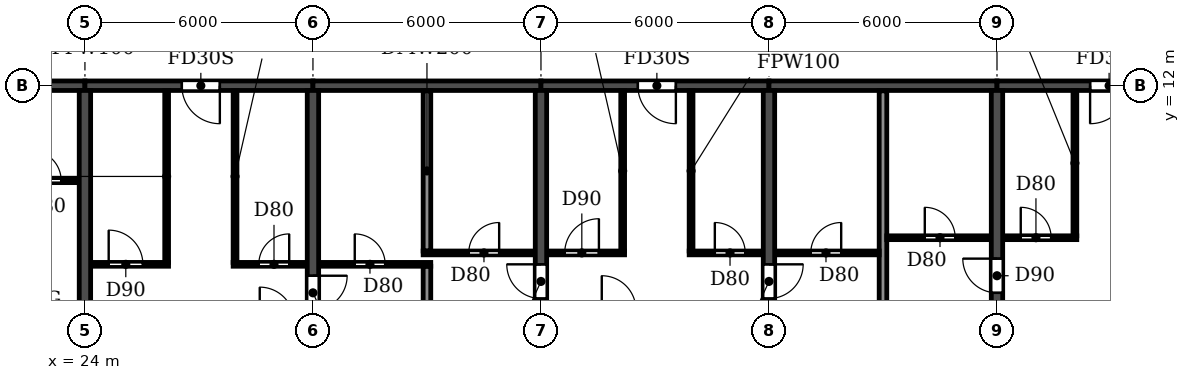
"""IFC4 building model, lengths in metres.
Left out: names, types, materials, properties, quantities, classifications, styles, units other than length and angle.
Written with IfcOpenShell. Run it as: python <this file> out.ifc"""

import sys

from ifc_helpers import new_model, si_unit, direction, frame, frame_2d, origin, place, context, subcontext, project, spatial, rectangle, extrude, element, fill, save


model = new_model("IFC4")
c1 = context("Model", 3, precision=1e-05, world=origin(), true_north=direction((0.0, 1.0)))
c2 = subcontext(c1, "Body", "Model", "MODEL_VIEW")
j1 = project(units=[si_unit("LENGTHUNIT", "METRE"), si_unit("PLANEANGLEUNIT", "RADIAN")], contexts=[c1])
p1 = place(None, origin())
s1 = spatial("IfcSite", under=j1, at=p1, CompositionType="ELEMENT")
p2 = place(p1, origin())
s2 = spatial("IfcBuilding", under=s1, at=p2, CompositionType="ELEMENT")
p3 = place(p2, frame((0.0, 0.0, 152.1)))
s3 = spatial("IfcBuildingStorey", under=s2, at=p3, CompositionType="ELEMENT", Elevation=152.1)
p4 = place(p3, frame((24.0, 0.2, 0.0), z_axis=(0.0, 0.0, 1.0), x_axis=(0.0, 1.0, 0.0)))
e1 = element("IfcWall", 1, at=p4, inside=s3, PredefinedType="SHEAR", context=c2, shape_type="SweptSolid", body=[
    extrude(rectangle(XDim=11.675, YDim=0.3, at=frame_2d((5.837, 0.0))), origin(), (0.0, 0.0, 1.0), 3.07),
])
p5 = place(p3, frame((30.0, 0.2, 0.0), z_axis=(0.0, 0.0, 1.0), x_axis=(0.0, 1.0, 0.0)))
e2 = element("IfcWall", 2, at=p5, inside=s3, PredefinedType="SHEAR", context=c2, shape_type="SweptSolid", body=[
    extrude(rectangle(XDim=11.675, YDim=0.3, at=frame_2d((5.837, 0.0))), origin(), (0.0, 0.0, 1.0), 3.07),
])
p6 = place(p5, frame((5.9, 0.0, 0.0)))
e3 = element("IfcOpeningElement", 3, at=p6, cuts=e2, PredefinedType="OPENING", context=c2, shape_type="SweptSolid", body=[
    extrude(rectangle(XDim=0.9, YDim=2.1, at=frame_2d((0.45, 1.05))), frame((0.0, 0.16, 0.0), z_axis=(0.0, -1.0, 0.0), x_axis=(1.0, 0.0, 0.0)), (0.0, 0.0, 1.0), 0.32),
])
p7 = place(p3, frame((36.0, 0.2, 0.0), z_axis=(0.0, 0.0, 1.0), x_axis=(0.0, 1.0, 0.0)))
e4 = element("IfcWall", 4, at=p7, inside=s3, PredefinedType="SHEAR", context=c2, shape_type="SweptSolid", body=[
    extrude(rectangle(XDim=11.675, YDim=0.3, at=frame_2d((5.837, 0.0))), origin(), (0.0, 0.0, 1.0), 3.07),
])
p8 = place(p7, frame((6.2, 0.0, 0.0)))
e5 = element("IfcOpeningElement", 5, at=p8, cuts=e4, PredefinedType="OPENING", context=c2, shape_type="SweptSolid", body=[
    extrude(rectangle(XDim=0.9, YDim=2.1, at=frame_2d((0.45, 1.05))), frame((0.0, 0.16, 0.0), z_axis=(0.0, -1.0, 0.0), x_axis=(1.0, 0.0, 0.0)), (0.0, 0.0, 1.0), 0.32),
])
p9 = place(p3, frame((42.0, 0.2, 0.0), z_axis=(0.0, 0.0, 1.0), x_axis=(0.0, 1.0, 0.0)))
e6 = element("IfcWall", 6, at=p9, inside=s3, PredefinedType="SHEAR", context=c2, shape_type="SweptSolid", body=[
    extrude(rectangle(XDim=11.675, YDim=0.3, at=frame_2d((5.837, 0.0))), origin(), (0.0, 0.0, 1.0), 3.07),
])
p10 = place(p9, frame((6.2, 0.0, 0.0)))
e7 = element("IfcOpeningElement", 7, at=p10, cuts=e6, PredefinedType="OPENING", context=c2, shape_type="SweptSolid", body=[
    extrude(rectangle(XDim=0.9, YDim=2.1, at=frame_2d((0.45, 1.05))), frame((0.0, 0.16, 0.0), z_axis=(0.0, -1.0, 0.0), x_axis=(1.0, 0.0, 0.0)), (0.0, 0.0, 1.0), 0.32),
])
p11 = place(p3, frame((48.0, 0.2, 0.0), z_axis=(0.0, 0.0, 1.0), x_axis=(0.0, 1.0, 0.0)))
e8 = element("IfcWall", 8, at=p11, inside=s3, PredefinedType="SHEAR", context=c2, shape_type="SweptSolid", body=[
    extrude(rectangle(XDim=11.675, YDim=0.3, at=frame_2d((5.837, 0.0))), origin(), (0.0, 0.0, 1.0), 3.07),
])
p12 = place(p11, frame((6.35, 0.0, 0.0)))
e9 = element("IfcOpeningElement", 9, at=p12, cuts=e8, PredefinedType="OPENING", context=c2, shape_type="SweptSolid", body=[
    extrude(rectangle(XDim=0.9, YDim=2.1, at=frame_2d((0.45, 1.05))), frame((0.0, 0.16, 0.0), z_axis=(0.0, -1.0, 0.0), x_axis=(1.0, 0.0, 0.0)), (0.0, 0.0, 1.0), 0.32),
])
p13 = place(p3, frame((18.0, 12.0, 0.0), z_axis=(0.0, 0.0, 1.0), x_axis=(1.0, 0.0, 0.0)))
e10 = element("IfcWall", 10, at=p13, inside=s3, PredefinedType="SHEAR", context=c2, shape_type="SweptSolid", body=[
    extrude(rectangle(XDim=6.0, YDim=0.25, at=frame_2d((3.0, 0.0))), origin(), (0.0, 0.0, 1.0), 2.47),
])
p14 = place(p13, frame((2.55, 0.0, 0.0)))
e11 = element("IfcOpeningElement", 11, at=p14, cuts=e10, PredefinedType="OPENING", context=c2, shape_type="SweptSolid", body=[
    extrude(rectangle(XDim=1.0, YDim=2.1, at=frame_2d((0.5, 1.05))), frame((0.0, 0.135, 0.0), z_axis=(0.0, -1.0, 0.0), x_axis=(1.0, 0.0, 0.0)), (0.0, 0.0, 1.0), 0.27),
])
p15 = place(p3, frame((24.0, 12.0, 0.0), z_axis=(0.0, 0.0, 1.0), x_axis=(1.0, 0.0, 0.0)))
e12 = element("IfcWall", 12, at=p15, inside=s3, PredefinedType="SHEAR", context=c2, shape_type="SweptSolid", body=[
    extrude(rectangle(XDim=6.0, YDim=0.25, at=frame_2d((3.0, 0.0))), origin(), (0.0, 0.0, 1.0), 2.47),
])
p16 = place(p15, frame((2.55, 0.0, 0.0)))
e13 = element("IfcOpeningElement", 13, at=p16, cuts=e12, PredefinedType="OPENING", context=c2, shape_type="SweptSolid", body=[
    extrude(rectangle(XDim=1.0, YDim=2.1, at=frame_2d((0.5, 1.05))), frame((0.0, 0.135, 0.0), z_axis=(0.0, -1.0, 0.0), x_axis=(1.0, 0.0, 0.0)), (0.0, 0.0, 1.0), 0.27),
])
p17 = place(p3, frame((30.0, 12.0, 0.0), z_axis=(0.0, 0.0, 1.0), x_axis=(1.0, 0.0, 0.0)))
e14 = element("IfcWall", 14, at=p17, inside=s3, PredefinedType="SHEAR", context=c2, shape_type="SweptSolid", body=[
    extrude(rectangle(XDim=6.0, YDim=0.25, at=frame_2d((3.0, 0.0))), origin(), (0.0, 0.0, 1.0), 2.47),
])
p18 = place(p3, frame((36.0, 12.0, 0.0), z_axis=(0.0, 0.0, 1.0), x_axis=(1.0, 0.0, 0.0)))
e15 = element("IfcWall", 15, at=p18, inside=s3, PredefinedType="SHEAR", context=c2, shape_type="SweptSolid", body=[
    extrude(rectangle(XDim=6.0, YDim=0.25, at=frame_2d((3.0, 0.0))), origin(), (0.0, 0.0, 1.0), 2.47),
])
p19 = place(p18, frame((2.55, 0.0, 0.0)))
e16 = element("IfcOpeningElement", 16, at=p19, cuts=e15, PredefinedType="OPENING", context=c2, shape_type="SweptSolid", body=[
    extrude(rectangle(XDim=1.0, YDim=2.1, at=frame_2d((0.5, 1.05))), frame((0.0, 0.135, 0.0), z_axis=(0.0, -1.0, 0.0), x_axis=(1.0, 0.0, 0.0)), (0.0, 0.0, 1.0), 0.27),
])
p20 = place(p3, frame((42.0, 12.0, 0.0), z_axis=(0.0, 0.0, 1.0), x_axis=(1.0, 0.0, 0.0)))
e17 = element("IfcWall", 17, at=p20, inside=s3, PredefinedType="SHEAR", context=c2, shape_type="SweptSolid", body=[
    extrude(rectangle(XDim=6.0, YDim=0.25, at=frame_2d((3.0, 0.0))), origin(), (0.0, 0.0, 1.0), 2.47),
])
p21 = place(p3, frame((48.0, 12.0, 0.0), z_axis=(0.0, 0.0, 1.0), x_axis=(1.0, 0.0, 0.0)))
e18 = element("IfcWall", 18, at=p21, inside=s3, PredefinedType="SHEAR", context=c2, shape_type="SweptSolid", body=[
    extrude(rectangle(XDim=6.0, YDim=0.25, at=frame_2d((3.0, 0.0))), origin(), (0.0, 0.0, 1.0), 2.47),
])
p22 = place(p21, frame((2.45, 0.0, 0.0)))
e19 = element("IfcOpeningElement", 19, at=p22, cuts=e18, PredefinedType="OPENING", context=c2, shape_type="SweptSolid", body=[
    extrude(rectangle(XDim=1.0, YDim=2.1, at=frame_2d((0.5, 1.05))), frame((0.0, 0.135, 0.0), z_axis=(0.0, -1.0, 0.0), x_axis=(1.0, 0.0, 0.0)), (0.0, 0.0, 1.0), 0.27),
])
p23 = place(p3, frame((33.0, 0.06, 0.0), z_axis=(0.0, 0.0, 1.0), x_axis=(0.0, 1.0, 0.0)))
e20 = element("IfcWall", 20, at=p23, inside=s3, PredefinedType="PARTITIONING", context=c2, shape_type="SweptSolid", body=[
    extrude(rectangle(XDim=7.19, YDim=0.2, at=frame_2d((3.595, 0.0))), origin(), (0.0, 0.0, 1.0), 3.07),
])
p24 = place(p3, frame((33.0, 7.65, 0.0), z_axis=(0.0, 0.0, 1.0), x_axis=(0.0, 1.0, 0.0)))
e21 = element("IfcWall", 21, at=p24, inside=s3, PredefinedType="PARTITIONING", context=c2, shape_type="SweptSolid", body=[
    extrude(rectangle(XDim=4.215, YDim=0.2, at=frame_2d((2.107, 0.0))), origin(), (0.0, 0.0, 1.0), 3.07),
])
p25 = place(p3, frame((45.0, 0.06, 0.0), z_axis=(0.0, 0.0, 1.0), x_axis=(0.0, 1.0, 0.0)))
e22 = element("IfcWall", 22, at=p25, inside=s3, PredefinedType="PARTITIONING", context=c2, shape_type="SweptSolid", body=[
    extrude(rectangle(XDim=11.805, YDim=0.2, at=frame_2d((5.902, 0.0))), origin(), (0.0, 0.0, 1.0), 3.07),
])
p26 = place(p3, frame((24.16, 7.3, 0.0), z_axis=(0.0, 0.0, 1.0), x_axis=(1.0, 0.0, 0.0)))
e23 = element("IfcWall", 23, at=p26, inside=s3, PredefinedType="PARTITIONING", context=c2, shape_type="SweptSolid", body=[
    extrude(rectangle(XDim=2.04, YDim=0.1, at=frame_2d((1.02, 0.0))), origin(), (0.0, 0.0, 1.0), 3.07),
])
p27 = place(p26, frame((0.465, 0.0, 0.0)))
e24 = element("IfcOpeningElement", 24, at=p27, cuts=e23, PredefinedType="OPENING", context=c2, shape_type="SweptSolid", body=[
    extrude(rectangle(XDim=0.9, YDim=2.1, at=frame_2d((0.45, 1.05))), frame((0.0, 0.06, 0.0), z_axis=(0.0, -1.0, 0.0), x_axis=(1.0, 0.0, 0.0)), (0.0, 0.0, 1.0), 0.12),
])
p28 = place(p3, frame((27.9, 7.3, 0.0), z_axis=(0.0, 0.0, 1.0), x_axis=(1.0, 0.0, 0.0)))
e25 = element("IfcWall", 25, at=p28, inside=s3, PredefinedType="PARTITIONING", context=c2, shape_type="SweptSolid", body=[
    extrude(rectangle(XDim=1.94, YDim=0.1, at=frame_2d((0.97, 0.0))), origin(), (0.0, 0.0, 1.0), 3.07),
])
p29 = place(p28, frame((0.675, 0.0, 0.0)))
e26 = element("IfcOpeningElement", 26, at=p29, cuts=e25, PredefinedType="OPENING", context=c2, shape_type="SweptSolid", body=[
    extrude(rectangle(XDim=0.8, YDim=2.1, at=frame_2d((0.4, 1.05))), frame((0.0, 0.06, 0.0), z_axis=(0.0, -1.0, 0.0), x_axis=(1.0, 0.0, 0.0)), (0.0, 0.0, 1.0), 0.12),
])
p30 = place(p3, frame((30.16, 7.3, 0.0), z_axis=(0.0, 0.0, 1.0), x_axis=(1.0, 0.0, 0.0)))
e27 = element("IfcWall", 27, at=p30, inside=s3, PredefinedType="PARTITIONING", context=c2, shape_type="SweptSolid", body=[
    extrude(rectangle(XDim=2.94, YDim=0.1, at=frame_2d((1.47, 0.0))), origin(), (0.0, 0.0, 1.0), 3.07),
])
p31 = place(p30, frame((0.94, 0.0, 0.0)))
e28 = element("IfcOpeningElement", 28, at=p31, cuts=e27, PredefinedType="OPENING", context=c2, shape_type="SweptSolid", body=[
    extrude(rectangle(XDim=0.8, YDim=2.1, at=frame_2d((0.4, 1.05))), frame((0.0, 0.06, 0.0), z_axis=(0.0, -1.0, 0.0), x_axis=(1.0, 0.0, 0.0)), (0.0, 0.0, 1.0), 0.12),
])
p32 = place(p3, frame((32.9, 7.6, 0.0), z_axis=(0.0, 0.0, 1.0), x_axis=(1.0, 0.0, 0.0)))
e29 = element("IfcWall", 29, at=p32, inside=s3, PredefinedType="PARTITIONING", context=c2, shape_type="SweptSolid", body=[
    extrude(rectangle(XDim=2.94, YDim=0.1, at=frame_2d((1.47, 0.0))), origin(), (0.0, 0.0, 1.0), 3.07),
])
p33 = place(p32, frame((1.2, 0.0, 0.0)))
e30 = element("IfcOpeningElement", 30, at=p33, cuts=e29, PredefinedType="OPENING", context=c2, shape_type="SweptSolid", body=[
    extrude(rectangle(XDim=0.8, YDim=2.1, at=frame_2d((0.4, 1.05))), frame((0.0, 0.06, 0.0), z_axis=(0.0, -1.0, 0.0), x_axis=(1.0, 0.0, 0.0)), (0.0, 0.0, 1.0), 0.12),
])
p34 = place(p3, frame((36.16, 7.6, 0.0), z_axis=(0.0, 0.0, 1.0), x_axis=(1.0, 0.0, 0.0)))
e31 = element("IfcWall", 31, at=p34, inside=s3, PredefinedType="PARTITIONING", context=c2, shape_type="SweptSolid", body=[
    extrude(rectangle(XDim=2.04, YDim=0.1, at=frame_2d((1.02, 0.0))), origin(), (0.0, 0.0, 1.0), 3.07),
])
p35 = place(p34, frame((0.465, 0.0, 0.0)))
e32 = element("IfcOpeningElement", 32, at=p35, cuts=e31, PredefinedType="OPENING", context=c2, shape_type="SweptSolid", body=[
    extrude(rectangle(XDim=0.9, YDim=2.1, at=frame_2d((0.45, 1.05))), frame((0.0, 0.06, 0.0), z_axis=(0.0, -1.0, 0.0), x_axis=(1.0, 0.0, 0.0)), (0.0, 0.0, 1.0), 0.12),
])
p36 = place(p3, frame((39.9, 7.6, 0.0), z_axis=(0.0, 0.0, 1.0), x_axis=(1.0, 0.0, 0.0)))
e33 = element("IfcWall", 33, at=p36, inside=s3, PredefinedType="PARTITIONING", context=c2, shape_type="SweptSolid", body=[
    extrude(rectangle(XDim=1.94, YDim=0.1, at=frame_2d((0.97, 0.0))), origin(), (0.0, 0.0, 1.0), 3.07),
])
p37 = place(p36, frame((0.675, 0.0, 0.0)))
e34 = element("IfcOpeningElement", 34, at=p37, cuts=e33, PredefinedType="OPENING", context=c2, shape_type="SweptSolid", body=[
    extrude(rectangle(XDim=0.8, YDim=2.1, at=frame_2d((0.4, 1.05))), frame((0.0, 0.06, 0.0), z_axis=(0.0, -1.0, 0.0), x_axis=(1.0, 0.0, 0.0)), (0.0, 0.0, 1.0), 0.12),
])
p38 = place(p3, frame((42.16, 7.6, 0.0), z_axis=(0.0, 0.0, 1.0), x_axis=(1.0, 0.0, 0.0)))
e35 = element("IfcWall", 35, at=p38, inside=s3, PredefinedType="PARTITIONING", context=c2, shape_type="SweptSolid", body=[
    extrude(rectangle(XDim=2.74, YDim=0.1, at=frame_2d((1.37, 0.0))), origin(), (0.0, 0.0, 1.0), 3.07),
])
p39 = place(p38, frame((0.94, 0.0, 0.0)))
e36 = element("IfcOpeningElement", 36, at=p39, cuts=e35, PredefinedType="OPENING", context=c2, shape_type="SweptSolid", body=[
    extrude(rectangle(XDim=0.8, YDim=2.1, at=frame_2d((0.4, 1.05))), frame((0.0, 0.06, 0.0), z_axis=(0.0, -1.0, 0.0), x_axis=(1.0, 0.0, 0.0)), (0.0, 0.0, 1.0), 0.12),
])
p40 = place(p3, frame((45.1, 8.0, 0.0), z_axis=(0.0, 0.0, 1.0), x_axis=(1.0, 0.0, 0.0)))
e37 = element("IfcWall", 37, at=p40, inside=s3, PredefinedType="PARTITIONING", context=c2, shape_type="SweptSolid", body=[
    extrude(rectangle(XDim=2.74, YDim=0.1, at=frame_2d((1.37, 0.0))), origin(), (0.0, 0.0, 1.0), 3.07),
])
p41 = place(p40, frame((1.0, 0.0, 0.0)))
e38 = element("IfcOpeningElement", 38, at=p41, cuts=e37, PredefinedType="OPENING", context=c2, shape_type="SweptSolid", body=[
    extrude(rectangle(XDim=0.8, YDim=2.1, at=frame_2d((0.4, 1.05))), frame((0.0, 0.06, 0.0), z_axis=(0.0, -1.0, 0.0), x_axis=(1.0, 0.0, 0.0)), (0.0, 0.0, 1.0), 0.12),
])
p42 = place(p3, frame((48.16, 8.0, 0.0), z_axis=(0.0, 0.0, 1.0), x_axis=(1.0, 0.0, 0.0)))
e39 = element("IfcWall", 39, at=p42, inside=s3, PredefinedType="PARTITIONING", context=c2, shape_type="SweptSolid", body=[
    extrude(rectangle(XDim=1.94, YDim=0.1, at=frame_2d((0.97, 0.0))), origin(), (0.0, 0.0, 1.0), 3.07),
])
p43 = place(p42, frame((0.465, 0.0, 0.0)))
e40 = element("IfcOpeningElement", 40, at=p43, cuts=e39, PredefinedType="OPENING", context=c2, shape_type="SweptSolid", body=[
    extrude(rectangle(XDim=0.8, YDim=2.1, at=frame_2d((0.4, 1.05))), frame((0.0, 0.06, 0.0), z_axis=(0.0, -1.0, 0.0), x_axis=(1.0, 0.0, 0.0)), (0.0, 0.0, 1.0), 0.12),
])
p44 = place(p3, frame((21.9, 9.5, 0.0), z_axis=(0.0, 0.0, 1.0), x_axis=(1.0, 0.0, 0.0)))
e41 = element("IfcWall", 41, at=p44, inside=s3, PredefinedType="PARTITIONING", context=c2, shape_type="SweptSolid", body=[
    extrude(rectangle(XDim=1.94, YDim=0.1, at=frame_2d((0.97, 0.0))), origin(), (0.0, 0.0, 1.0), 3.07),
])
p45 = place(p44, frame((0.675, 0.0, 0.0)))
e42 = element("IfcOpeningElement", 42, at=p45, cuts=e41, PredefinedType="OPENING", context=c2, shape_type="SweptSolid", body=[
    extrude(rectangle(XDim=0.8, YDim=2.1, at=frame_2d((0.4, 1.05))), frame((0.0, 0.06, 0.0), z_axis=(0.0, -1.0, 0.0), x_axis=(1.0, 0.0, 0.0)), (0.0, 0.0, 1.0), 0.12),
])
for number, where, z_axis, x_axis in (
    (43, (26.15, 7.35, 0.0), (0.0, 0.0, 1.0), (0.0, 1.0, 0.0)),
    (44, (27.95, 7.35, 0.0), (0.0, 0.0, 1.0), (0.0, 1.0, 0.0)),
):
    element("IfcWall", number, at=place(p3, frame(where, z_axis=z_axis, x_axis=x_axis)), inside=s3, PredefinedType="PARTITIONING", context=c2, shape_type="SweptSolid", body=[
        extrude(rectangle(XDim=4.515, YDim=0.1, at=frame_2d((2.257, 0.0))), origin(), (0.0, 0.0, 1.0), 3.07),
    ])
for number, where, z_axis, x_axis in (
    (45, (38.15, 7.65, 0.0), (0.0, 0.0, 1.0), (0.0, 1.0, 0.0)),
    (46, (39.95, 7.65, 0.0), (0.0, 0.0, 1.0), (0.0, 1.0, 0.0)),
):
    element("IfcWall", number, at=place(p3, frame(where, z_axis=z_axis, x_axis=x_axis)), inside=s3, PredefinedType="PARTITIONING", context=c2, shape_type="SweptSolid", body=[
        extrude(rectangle(XDim=4.215, YDim=0.1, at=frame_2d((2.107, 0.0))), origin(), (0.0, 0.0, 1.0), 3.07),
    ])
p46 = place(p3, frame((50.05, 8.05, 0.0), z_axis=(0.0, 0.0, 1.0), x_axis=(0.0, 1.0, 0.0)))
e47 = element("IfcWall", 47, at=p46, inside=s3, PredefinedType="PARTITIONING", context=c2, shape_type="SweptSolid", body=[
    extrude(rectangle(XDim=3.815, YDim=0.1, at=frame_2d((1.907, 0.0))), origin(), (0.0, 0.0, 1.0), 3.07),
])
p47 = place(p45, origin())
e48 = element("IfcDoor", 48, at=p47, inside=s3, OperationType="SINGLE_SWING_LEFT", PredefinedType="DOOR", context=c2, shape_type="SweptSolid", body=[
    extrude(rectangle(XDim=0.8, YDim=2.1, at=frame_2d((0.4, 1.05))), frame((0.0, 0.025, 0.0), z_axis=(0.0, -1.0, 0.0), x_axis=(1.0, 0.0, 0.0)), (0.0, 0.0, 1.0), 0.05),
])
fill(e42, e48)
p48 = place(p31, origin())
e49 = element("IfcDoor", 49, at=p48, inside=s3, OperationType="SINGLE_SWING_LEFT", PredefinedType="DOOR", context=c2, shape_type="SweptSolid", body=[
    extrude(rectangle(XDim=0.8, YDim=2.1, at=frame_2d((0.4, 1.05))), frame((0.0, 0.025, 0.0), z_axis=(0.0, -1.0, 0.0), x_axis=(1.0, 0.0, 0.0)), (0.0, 0.0, 1.0), 0.05),
])
fill(e28, e49)
p49 = place(p27, origin())
e50 = element("IfcDoor", 50, at=p49, inside=s3, OperationType="SINGLE_SWING_LEFT", PredefinedType="DOOR", context=c2, shape_type="SweptSolid", body=[
    extrude(rectangle(XDim=0.9, YDim=2.1, at=frame_2d((0.45, 1.05))), frame((0.0, 0.025, 0.0), z_axis=(0.0, -1.0, 0.0), x_axis=(1.0, 0.0, 0.0)), (0.0, 0.0, 1.0), 0.05),
])
fill(e24, e50)
p50 = place(p16, frame((1.0, 0.0, 0.0), z_axis=(0.0, 0.0, 1.0), x_axis=(-1.0, 0.0, 0.0)))
e51 = element("IfcDoor", 51, at=p50, inside=s3, OperationType="SINGLE_SWING_LEFT", PredefinedType="DOOR", context=c2, shape_type="SweptSolid", body=[
    extrude(rectangle(XDim=1.0, YDim=2.1, at=frame_2d((0.5, 1.05))), frame((0.0, 0.025, 0.0), z_axis=(0.0, -1.0, 0.0), x_axis=(1.0, 0.0, 0.0)), (0.0, 0.0, 1.0), 0.05),
])
fill(e13, e51)
p51 = place(p29, origin())
e52 = element("IfcDoor", 52, at=p51, inside=s3, OperationType="SINGLE_SWING_RIGHT", PredefinedType="DOOR", context=c2, shape_type="SweptSolid", body=[
    extrude(rectangle(XDim=0.8, YDim=2.1, at=frame_2d((0.4, 1.05))), frame((0.0, 0.025, 0.0), z_axis=(0.0, -1.0, 0.0), x_axis=(1.0, 0.0, 0.0)), (0.0, 0.0, 1.0), 0.05),
])
fill(e26, e52)
p52 = place(p6, frame((0.9, 0.0, 0.0), z_axis=(0.0, 0.0, 1.0), x_axis=(-1.0, 0.0, 0.0)))
e53 = element("IfcDoor", 53, at=p52, inside=s3, OperationType="SINGLE_SWING_LEFT", PredefinedType="DOOR", context=c2, shape_type="SweptSolid", body=[
    extrude(rectangle(XDim=0.9, YDim=2.1, at=frame_2d((0.45, 1.05))), frame((0.0, 0.025, 0.0), z_axis=(0.0, -1.0, 0.0), x_axis=(1.0, 0.0, 0.0)), (0.0, 0.0, 1.0), 0.05),
])
fill(e3, e53)
p53 = place(p33, origin())
e54 = element("IfcDoor", 54, at=p53, inside=s3, OperationType="SINGLE_SWING_RIGHT", PredefinedType="DOOR", context=c2, shape_type="SweptSolid", body=[
    extrude(rectangle(XDim=0.8, YDim=2.1, at=frame_2d((0.4, 1.05))), frame((0.0, 0.025, 0.0), z_axis=(0.0, -1.0, 0.0), x_axis=(1.0, 0.0, 0.0)), (0.0, 0.0, 1.0), 0.05),
])
fill(e30, e54)
p54 = place(p39, origin())
e55 = element("IfcDoor", 55, at=p54, inside=s3, OperationType="SINGLE_SWING_RIGHT", PredefinedType="DOOR", context=c2, shape_type="SweptSolid", body=[
    extrude(rectangle(XDim=0.8, YDim=2.1, at=frame_2d((0.4, 1.05))), frame((0.0, 0.025, 0.0), z_axis=(0.0, -1.0, 0.0), x_axis=(1.0, 0.0, 0.0)), (0.0, 0.0, 1.0), 0.05),
])
fill(e36, e55)
p55 = place(p8, origin())
e56 = element("IfcDoor", 56, at=p55, inside=s3, OperationType="SINGLE_SWING_RIGHT", PredefinedType="DOOR", context=c2, shape_type="SweptSolid", body=[
    extrude(rectangle(XDim=0.9, YDim=2.1, at=frame_2d((0.45, 1.05))), frame((0.0, 0.025, 0.0), z_axis=(0.0, -1.0, 0.0), x_axis=(1.0, 0.0, 0.0)), (0.0, 0.0, 1.0), 0.05),
])
fill(e5, e56)
p56 = place(p35, origin())
e57 = element("IfcDoor", 57, at=p56, inside=s3, OperationType="SINGLE_SWING_RIGHT", PredefinedType="DOOR", context=c2, shape_type="SweptSolid", body=[
    extrude(rectangle(XDim=0.9, YDim=2.1, at=frame_2d((0.45, 1.05))), frame((0.0, 0.025, 0.0), z_axis=(0.0, -1.0, 0.0), x_axis=(1.0, 0.0, 0.0)), (0.0, 0.0, 1.0), 0.05),
])
fill(e32, e57)
p57 = place(p19, frame((1.0, 0.0, 0.0), z_axis=(0.0, 0.0, 1.0), x_axis=(-1.0, 0.0, 0.0)))
e58 = element("IfcDoor", 58, at=p57, inside=s3, OperationType="SINGLE_SWING_LEFT", PredefinedType="DOOR", context=c2, shape_type="SweptSolid", body=[
    extrude(rectangle(XDim=1.0, YDim=2.1, at=frame_2d((0.5, 1.05))), frame((0.0, 0.025, 0.0), z_axis=(0.0, -1.0, 0.0), x_axis=(1.0, 0.0, 0.0)), (0.0, 0.0, 1.0), 0.05),
])
fill(e16, e58)
p58 = place(p37, origin())
e59 = element("IfcDoor", 59, at=p58, inside=s3, OperationType="SINGLE_SWING_LEFT", PredefinedType="DOOR", context=c2, shape_type="SweptSolid", body=[
    extrude(rectangle(XDim=0.8, YDim=2.1, at=frame_2d((0.4, 1.05))), frame((0.0, 0.025, 0.0), z_axis=(0.0, -1.0, 0.0), x_axis=(1.0, 0.0, 0.0)), (0.0, 0.0, 1.0), 0.05),
])
fill(e34, e59)
p59 = place(p10, frame((0.9, 0.0, 0.0), z_axis=(0.0, 0.0, 1.0), x_axis=(-1.0, 0.0, 0.0)))
e60 = element("IfcDoor", 60, at=p59, inside=s3, OperationType="SINGLE_SWING_LEFT", PredefinedType="DOOR", context=c2, shape_type="SweptSolid", body=[
    extrude(rectangle(XDim=0.9, YDim=2.1, at=frame_2d((0.45, 1.05))), frame((0.0, 0.025, 0.0), z_axis=(0.0, -1.0, 0.0), x_axis=(1.0, 0.0, 0.0)), (0.0, 0.0, 1.0), 0.05),
])
fill(e7, e60)
p60 = place(p41, origin())
e61 = element("IfcDoor", 61, at=p60, inside=s3, OperationType="SINGLE_SWING_LEFT", PredefinedType="DOOR", context=c2, shape_type="SweptSolid", body=[
    extrude(rectangle(XDim=0.8, YDim=2.1, at=frame_2d((0.4, 1.05))), frame((0.0, 0.025, 0.0), z_axis=(0.0, -1.0, 0.0), x_axis=(1.0, 0.0, 0.0)), (0.0, 0.0, 1.0), 0.05),
])
fill(e38, e61)
p61 = place(p12, origin())
e62 = element("IfcDoor", 62, at=p61, inside=s3, OperationType="SINGLE_SWING_RIGHT", PredefinedType="DOOR", context=c2, shape_type="SweptSolid", body=[
    extrude(rectangle(XDim=0.9, YDim=2.1, at=frame_2d((0.45, 1.05))), frame((0.0, 0.025, 0.0), z_axis=(0.0, -1.0, 0.0), x_axis=(1.0, 0.0, 0.0)), (0.0, 0.0, 1.0), 0.05),
])
fill(e9, e62)
p62 = place(p43, origin())
e63 = element("IfcDoor", 63, at=p62, inside=s3, OperationType="SINGLE_SWING_LEFT", PredefinedType="DOOR", context=c2, shape_type="SweptSolid", body=[
    extrude(rectangle(XDim=0.8, YDim=2.1, at=frame_2d((0.4, 1.05))), frame((0.0, 0.025, 0.0), z_axis=(0.0, -1.0, 0.0), x_axis=(1.0, 0.0, 0.0)), (0.0, 0.0, 1.0), 0.05),
])
fill(e40, e63)
p63 = place(p22, frame((1.0, 0.0, 0.0), z_axis=(0.0, 0.0, 1.0), x_axis=(-1.0, 0.0, 0.0)))
e64 = element("IfcDoor", 64, at=p63, inside=s3, OperationType="SINGLE_SWING_RIGHT", PredefinedType="DOOR", context=c2, shape_type="SweptSolid", body=[
    extrude(rectangle(XDim=1.0, YDim=2.1, at=frame_2d((0.5, 1.05))), frame((0.0, 0.025, 0.0), z_axis=(0.0, -1.0, 0.0), x_axis=(1.0, 0.0, 0.0)), (0.0, 0.0, 1.0), 0.05),
])
fill(e19, e64)
save(model, sys.argv[1])
